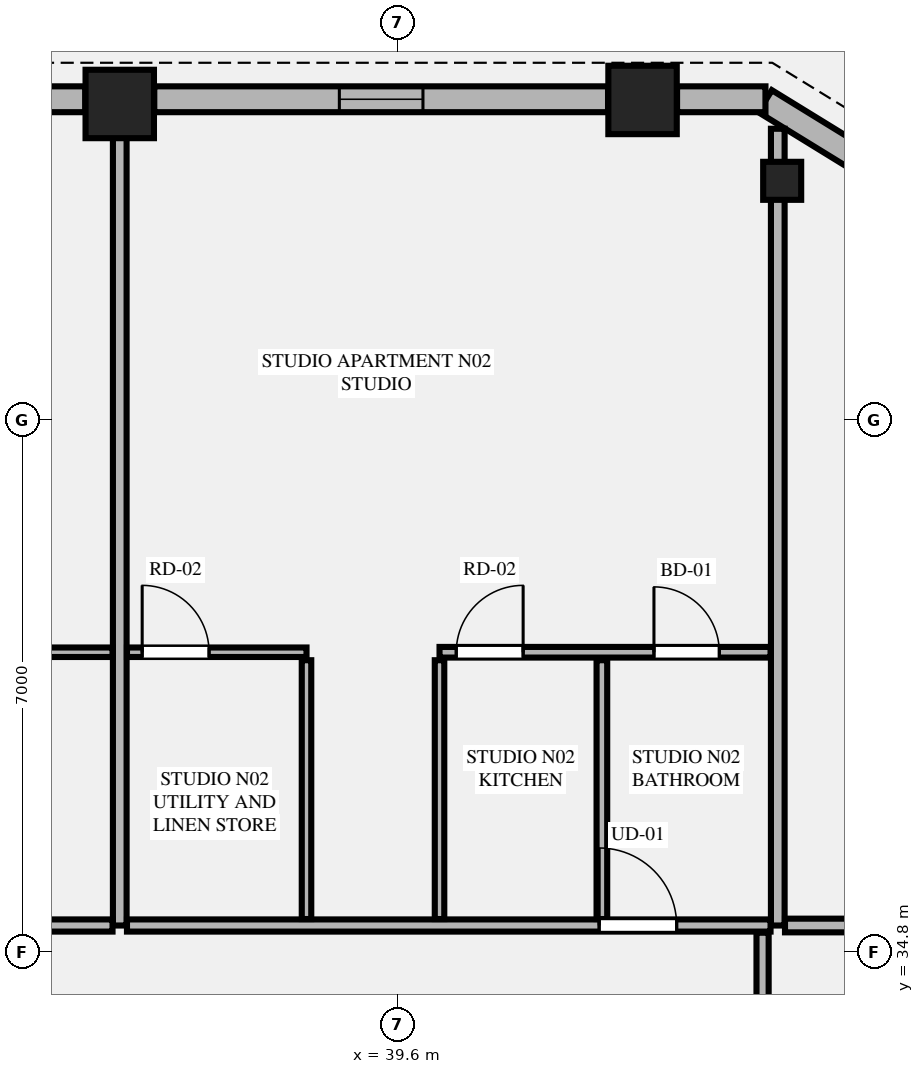
"""IFC4 building model, lengths in metres.
Left out: names, types, materials, properties, quantities, classifications, styles, units other than length and angle.
Written with IfcOpenShell. Run it as: python <this file> out.ifc"""

import sys

from ifc_helpers import new_model, si_unit, direction, frame, frame_2d, origin, origin_2d, place, context, subcontext, project, spatial, rectangle, extrude, element, fill, save


model = new_model("IFC4")
c1 = context("Model", 3, precision=1e-05, world=origin(), true_north=direction((0.0, 1.0)))
c2 = subcontext(c1, "Body", "Model", "MODEL_VIEW")
j1 = project(units=[si_unit("LENGTHUNIT", "METRE"), si_unit("PLANEANGLEUNIT", "RADIAN")], contexts=[c1])
p1 = place(None, origin())
s1 = spatial("IfcSite", under=j1, at=p1, CompositionType="ELEMENT")
p2 = place(p1, origin())
s2 = spatial("IfcBuilding", under=s1, at=p2, CompositionType="ELEMENT")
p3 = place(p2, frame((0.0, 0.0, 171.9)))
s3 = spatial("IfcBuildingStorey", under=s2, at=p3, CompositionType="ELEMENT", Elevation=171.9)
for number, where, z_axis, x_axis in (
    (1, (42.821, 46.011, 0.0), (0.0, 0.0, 1.0), (1.0, 0.0, 0.0)),
    (2, (35.943, 45.958, 0.0), (0.0, 0.0, 1.0), (1.0, 0.0, 0.0)),
):
    element("IfcColumn", number, at=place(p3, frame(where, z_axis=z_axis, x_axis=x_axis)), inside=s3, PredefinedType="COLUMN", context=c2, shape_type="SweptSolid", body=[
        extrude(rectangle(XDim=0.9, YDim=0.9, at=origin_2d()), origin(), (0.0, 0.0, 1.0), 3.55),
    ])
p4 = place(p3, frame((44.658, 44.947, 0.0), z_axis=(0.0, 0.0, 1.0), x_axis=(-0.865230187018, 0.501374833306, 0.0)))
e3 = element("IfcColumn", 3, at=p4, inside=s3, PredefinedType="PILASTER", context=c2, shape_type="SweptSolid", body=[
    extrude(rectangle(XDim=0.5, YDim=0.35, at=origin_2d()), origin(), (0.0, 0.0, 1.0), 3.55),
])
p5 = place(p3, frame((45.862, 45.116, 0.0), z_axis=(0.0, 0.0, 1.0), x_axis=(-0.851713271379, 0.524008113828, 0.0)))
e4 = element("IfcWall", 4, at=p5, inside=s3, PredefinedType="STANDARD", context=c2, shape_type="SweptSolid", body=[
    extrude(rectangle(XDim=1.678, YDim=0.34, at=frame_2d((0.839, 0.0))), origin(), (0.0, 0.0, 1.0), 3.35),
])
p6 = place(p3, frame((44.438, 46.02, 0.0), z_axis=(0.0, 0.0, 1.0), x_axis=(-1.0, 0.0, 0.0)))
e5 = element("IfcWall", 5, at=p6, inside=s3, PredefinedType="STANDARD", context=c2, shape_type="SweptSolid", body=[
    extrude(rectangle(XDim=1.163, YDim=0.34, at=frame_2d((0.582, 0.0))), origin(), (0.0, 0.0, 1.0), 3.35),
])
p7 = place(p3, frame((42.367, 46.02, 0.0), z_axis=(0.0, 0.0, 1.0), x_axis=(-1.0, 0.0, 0.0)))
e6 = element("IfcWall", 6, at=p7, inside=s3, PredefinedType="STANDARD", context=c2, shape_type="SweptSolid", body=[
    extrude(rectangle(XDim=5.97, YDim=0.34, at=frame_2d((2.985, 0.0))), origin(), (0.0, 0.0, 1.0), 2.883),
])
p8 = place(p7, frame((2.435, 0.0, 0.75)))
e7 = element("IfcOpeningElement", 7, at=p8, cuts=e6, PredefinedType="OPENING", context=c2, shape_type="SweptSolid", body=[
    extrude(rectangle(XDim=1.1, YDim=1.983, at=frame_2d((0.55, 0.991))), frame((0.0, 0.18, 0.0), z_axis=(0.0, -1.0, 0.0), x_axis=(1.0, 0.0, 0.0)), (0.0, 0.0, 1.0), 0.36),
])
p9 = place(p3, frame((35.489, 46.02, 0.0), z_axis=(0.0, 0.0, 1.0), x_axis=(-1.0, 0.0, 0.0)))
e8 = element("IfcWall", 8, at=p9, inside=s3, PredefinedType="STANDARD", context=c2, shape_type="SweptSolid", body=[
    extrude(rectangle(XDim=6.178, YDim=0.34, at=frame_2d((3.089, 0.0))), origin(), (0.0, 0.0, 1.0), 2.883),
])
p10 = place(p9, frame((1.468, 0.0, 0.0)))
e9 = element("IfcOpeningElement", 9, at=p10, cuts=e8, PredefinedType="OPENING", context=c2, shape_type="SweptSolid", body=[
    extrude(rectangle(XDim=1.5, YDim=2.3, at=frame_2d((0.75, 1.15))), frame((0.0, 0.18, 0.0), z_axis=(0.0, -1.0, 0.0), x_axis=(1.0, 0.0, 0.0)), (0.0, 0.0, 1.0), 0.36),
])
p11 = place(p9, frame((4.872, 0.0, 0.75)))
e10 = element("IfcOpeningElement", 10, at=p11, cuts=e8, PredefinedType="OPENING", context=c2, shape_type="SweptSolid", body=[
    extrude(rectangle(XDim=1.086, YDim=1.983, at=frame_2d((0.543, 0.991))), frame((0.0, 0.18, 0.0), z_axis=(0.0, -1.0, 0.0), x_axis=(1.0, 0.0, 0.0)), (0.0, 0.0, 1.0), 0.36),
])
p12 = place(p3, frame((35.943, 35.15, 0.0), z_axis=(0.0, 0.0, 1.0), x_axis=(0.0, 1.0, 0.0)))
e11 = element("IfcWall", 11, at=p12, inside=s3, PredefinedType="PARTITIONING", context=c2, shape_type="SweptSolid", body=[
    extrude(rectangle(XDim=10.695, YDim=0.18, at=frame_2d((5.348, 0.0))), origin(), (0.0, 0.0, 1.0), 2.807),
])
p13 = place(p3, frame((44.6, 35.15, 0.0), z_axis=(0.0, 0.0, 1.0), x_axis=(0.0, 1.0, 0.0)))
e12 = element("IfcWall", 12, at=p13, inside=s3, PredefinedType="PARTITIONING", context=c2, shape_type="SweptSolid", body=[
    extrude(rectangle(XDim=10.482, YDim=0.18, at=frame_2d((5.241, 0.0))), origin(), (0.0, 0.0, 1.0), 3.35),
])
p14 = place(p3, frame((20.295, 35.15, 0.0), z_axis=(0.0, 0.0, 1.0), x_axis=(1.0, 0.0, 0.0)))
e13 = element("IfcWall", 13, at=p14, inside=s3, PredefinedType="PARTITIONING", context=c2, shape_type="SweptSolid", body=[
    extrude(rectangle(XDim=15.553, YDim=0.16, at=frame_2d((7.776, 0.0))), origin(), (0.0, 0.0, 1.0), 3.35),
])
p15 = place(p14, frame((0.405, 0.0, 0.0)))
e14 = element("IfcOpeningElement", 14, at=p15, cuts=e13, PredefinedType="OPENING", context=c2, shape_type="SweptSolid", body=[
    extrude(rectangle(XDim=1.02, YDim=2.25, at=frame_2d((0.51, 1.125))), frame((0.0, 0.09, 0.0), z_axis=(0.0, -1.0, 0.0), x_axis=(1.0, 0.0, 0.0)), (0.0, 0.0, 1.0), 0.18),
])
p16 = place(p3, frame((30.95, 38.745, 0.0), z_axis=(0.0, 0.0, 1.0), x_axis=(1.0, 0.0, 0.0)))
e15 = element("IfcWall", 15, at=p16, inside=s3, PredefinedType="PARTITIONING", context=c2, shape_type="SweptSolid", body=[
    extrude(rectangle(XDim=4.898, YDim=0.125, at=frame_2d((2.449, 0.0))), origin(), (0.0, 0.0, 1.0), 3.35),
])
p17 = place(p16, frame((2.024, 0.0, 0.0)))
e16 = element("IfcOpeningElement", 16, at=p17, cuts=e15, PredefinedType="OPENING", context=c2, shape_type="SweptSolid", body=[
    extrude(rectangle(XDim=0.86, YDim=2.1, at=frame_2d((0.43, 1.05))), frame((0.0, 0.073, 0.0), z_axis=(0.0, -1.0, 0.0), x_axis=(1.0, 0.0, 0.0)), (0.0, 0.0, 1.0), 0.145),
])
p18 = place(p3, frame((36.038, 35.15, 0.0), z_axis=(0.0, 0.0, 1.0), x_axis=(1.0, 0.0, 0.0)))
e17 = element("IfcWall", 17, at=p18, inside=s3, PredefinedType="PARTITIONING", context=c2, shape_type="SweptSolid", body=[
    extrude(rectangle(XDim=8.467, YDim=0.16, at=frame_2d((4.233, 0.0))), origin(), (0.0, 0.0, 1.0), 3.35),
])
p19 = place(p18, frame((6.212, 0.0, 0.0)))
e18 = element("IfcOpeningElement", 18, at=p19, cuts=e17, PredefinedType="OPENING", context=c2, shape_type="SweptSolid", body=[
    extrude(rectangle(XDim=1.02, YDim=2.25, at=frame_2d((0.51, 1.125))), frame((0.0, 0.09, 0.0), z_axis=(0.0, -1.0, 0.0), x_axis=(1.0, 0.0, 0.0)), (0.0, 0.0, 1.0), 0.18),
])
p20 = place(p3, frame((40.15, 35.235, 0.0), z_axis=(0.0, 0.0, 1.0), x_axis=(0.0, 1.0, 0.0)))
e19 = element("IfcWall", 19, at=p20, inside=s3, PredefinedType="PARTITIONING", context=c2, shape_type="SweptSolid", body=[
    extrude(rectangle(XDim=3.405, YDim=0.125, at=frame_2d((1.702, 0.0))), origin(), (0.0, 0.0, 1.0), 3.35),
])
p21 = place(p3, frame((40.15, 38.745, 0.0), z_axis=(0.0, 0.0, 1.0), x_axis=(1.0, 0.0, 0.0)))
e20 = element("IfcWall", 20, at=p21, inside=s3, PredefinedType="PLUMBINGWALL", context=c2, shape_type="SweptSolid", body=[
    extrude(rectangle(XDim=4.355, YDim=0.14, at=frame_2d((2.177, 0.0))), origin(), (0.0, 0.0, 1.0), 3.35),
])
p22 = place(p21, frame((2.821, 0.0, 0.0)))
e21 = element("IfcOpeningElement", 21, at=p22, cuts=e20, PredefinedType="OPENING", context=c2, shape_type="SweptSolid", body=[
    extrude(rectangle(XDim=0.86, YDim=2.1, at=frame_2d((0.43, 1.05))), frame((0.0, 0.08, 0.0), z_axis=(0.0, -1.0, 0.0), x_axis=(1.0, 0.0, 0.0)), (0.0, 0.0, 1.0), 0.16),
])
p23 = place(p21, frame((0.22, 0.0, 0.0)))
e22 = element("IfcOpeningElement", 22, at=p23, cuts=e20, PredefinedType="OPENING", context=c2, shape_type="SweptSolid", body=[
    extrude(rectangle(XDim=0.88, YDim=2.15, at=frame_2d((0.44, 1.075))), frame((0.0, 0.08, 0.0), z_axis=(0.0, -1.0, 0.0), x_axis=(1.0, 0.0, 0.0)), (0.0, 0.0, 1.0), 0.16),
])
p24 = place(p3, frame((42.286, 35.235, 0.0), z_axis=(0.0, 0.0, 1.0), x_axis=(0.0, 1.0, 0.0)))
e23 = element("IfcWall", 23, at=p24, inside=s3, PredefinedType="PLUMBINGWALL", context=c2, shape_type="SweptSolid", body=[
    extrude(rectangle(XDim=3.405, YDim=0.14, at=frame_2d((1.702, 0.0))), origin(), (0.0, 0.0, 1.0), 2.807),
])
p25 = place(p3, frame((38.4, 35.235, 0.0), z_axis=(0.0, 0.0, 1.0), x_axis=(0.0, 1.0, 0.0)))
e24 = element("IfcWall", 24, at=p25, inside=s3, PredefinedType="PARTITIONING", context=c2, shape_type="SweptSolid", body=[
    extrude(rectangle(XDim=3.405, YDim=0.125, at=frame_2d((1.702, 0.0))), origin(), (0.0, 0.0, 1.0), 3.35),
])
p26 = place(p3, frame((36.038, 38.745, 0.0), z_axis=(0.0, 0.0, 1.0), x_axis=(1.0, 0.0, 0.0)))
e25 = element("IfcWall", 25, at=p26, inside=s3, PredefinedType="PARTITIONING", context=c2, shape_type="SweptSolid", body=[
    extrude(rectangle(XDim=2.362, YDim=0.125, at=frame_2d((1.181, 0.0))), origin(), (0.0, 0.0, 1.0), 3.35),
])
p27 = place(p26, frame((0.2, 0.0, 0.0)))
e26 = element("IfcOpeningElement", 26, at=p27, cuts=e25, PredefinedType="OPENING", context=c2, shape_type="SweptSolid", body=[
    extrude(rectangle(XDim=0.88, YDim=2.15, at=frame_2d((0.44, 1.075))), frame((0.0, 0.073, 0.0), z_axis=(0.0, -1.0, 0.0), x_axis=(1.0, 0.0, 0.0)), (0.0, 0.0, 1.0), 0.145),
])
p28 = place(p3, frame((44.695, 35.15, 0.0), z_axis=(0.0, 0.0, 1.0), x_axis=(1.0, 0.0, 0.0)))
e27 = element("IfcWall", 27, at=p28, inside=s3, PredefinedType="PARTITIONING", context=c2, shape_type="SweptSolid", body=[
    extrude(rectangle(XDim=5.995, YDim=0.18, at=frame_2d((2.998, 0.0))), origin(), (0.0, 0.0, 1.0), 3.35),
])
p29 = place(p3, frame((44.4, 16.345, 0.0), z_axis=(0.0, 0.0, 1.0), x_axis=(0.0, 1.0, 0.0)))
e28 = element("IfcWall", 28, at=p29, inside=s3, PredefinedType="PARTITIONING", context=c2, shape_type="SweptSolid", body=[
    extrude(rectangle(XDim=18.71, YDim=0.16, at=frame_2d((9.355, 0.0))), origin(), (0.0, 0.0, 1.0), 3.35),
])
p30 = place(p29, frame((0.45, 0.0, 0.0)))
e29 = element("IfcOpeningElement", 29, at=p30, cuts=e28, PredefinedType="OPENING", context=c2, shape_type="SweptSolid", body=[
    extrude(rectangle(XDim=1.02, YDim=2.25, at=frame_2d((0.51, 1.125))), frame((0.0, 0.09, 0.0), z_axis=(0.0, -1.0, 0.0), x_axis=(1.0, 0.0, 0.0)), (0.0, 0.0, 1.0), 0.18),
])
p31 = place(p8, origin())
e30 = element("IfcWindow", 30, at=p31, inside=s3, PartitioningType="SINGLE_PANEL", PredefinedType="WINDOW", context=c2, shape_type="SweptSolid", body=[
    extrude(rectangle(XDim=1.1, YDim=1.983, at=frame_2d((0.55, 0.991))), frame((0.0, 0.03, 0.0), z_axis=(0.0, -1.0, 0.0), x_axis=(1.0, 0.0, 0.0)), (0.0, 0.0, 1.0), 0.06),
])
fill(e7, e30)
p32 = place(p27, origin())
e31 = element("IfcDoor", 31, at=p32, inside=s3, OperationType="SINGLE_SWING_LEFT", PredefinedType="DOOR", context=c2, shape_type="SweptSolid", body=[
    extrude(rectangle(XDim=0.88, YDim=2.15, at=frame_2d((0.44, 1.075))), frame((0.0, 0.025, 0.0), z_axis=(0.0, -1.0, 0.0), x_axis=(1.0, 0.0, 0.0)), (0.0, 0.0, 1.0), 0.05),
])
fill(e26, e31)
p33 = place(p22, origin())
e32 = element("IfcDoor", 32, at=p33, inside=s3, OperationType="SINGLE_SWING_LEFT", PredefinedType="DOOR", context=c2, shape_type="SweptSolid", body=[
    extrude(rectangle(XDim=0.86, YDim=2.1, at=frame_2d((0.43, 1.05))), frame((0.0, 0.025, 0.0), z_axis=(0.0, -1.0, 0.0), x_axis=(1.0, 0.0, 0.0)), (0.0, 0.0, 1.0), 0.05),
])
fill(e21, e32)
p34 = place(p19, origin())
e33 = element("IfcDoor", 33, at=p34, inside=s3, OperationType="SINGLE_SWING_LEFT", PredefinedType="DOOR", context=c2, shape_type="SweptSolid", body=[
    extrude(rectangle(XDim=1.02, YDim=2.25, at=frame_2d((0.51, 1.125))), frame((0.0, 0.025, 0.0), z_axis=(0.0, -1.0, 0.0), x_axis=(1.0, 0.0, 0.0)), (0.0, 0.0, 1.0), 0.05),
])
fill(e18, e33)
p35 = place(p23, origin())
e34 = element("IfcDoor", 34, at=p35, inside=s3, OperationType="SINGLE_SWING_RIGHT", PredefinedType="DOOR", context=c2, shape_type="SweptSolid", body=[
    extrude(rectangle(XDim=0.88, YDim=2.15, at=frame_2d((0.44, 1.075))), frame((0.0, 0.025, 0.0), z_axis=(0.0, -1.0, 0.0), x_axis=(1.0, 0.0, 0.0)), (0.0, 0.0, 1.0), 0.05),
])
fill(e22, e34)
save(model, sys.argv[1])
